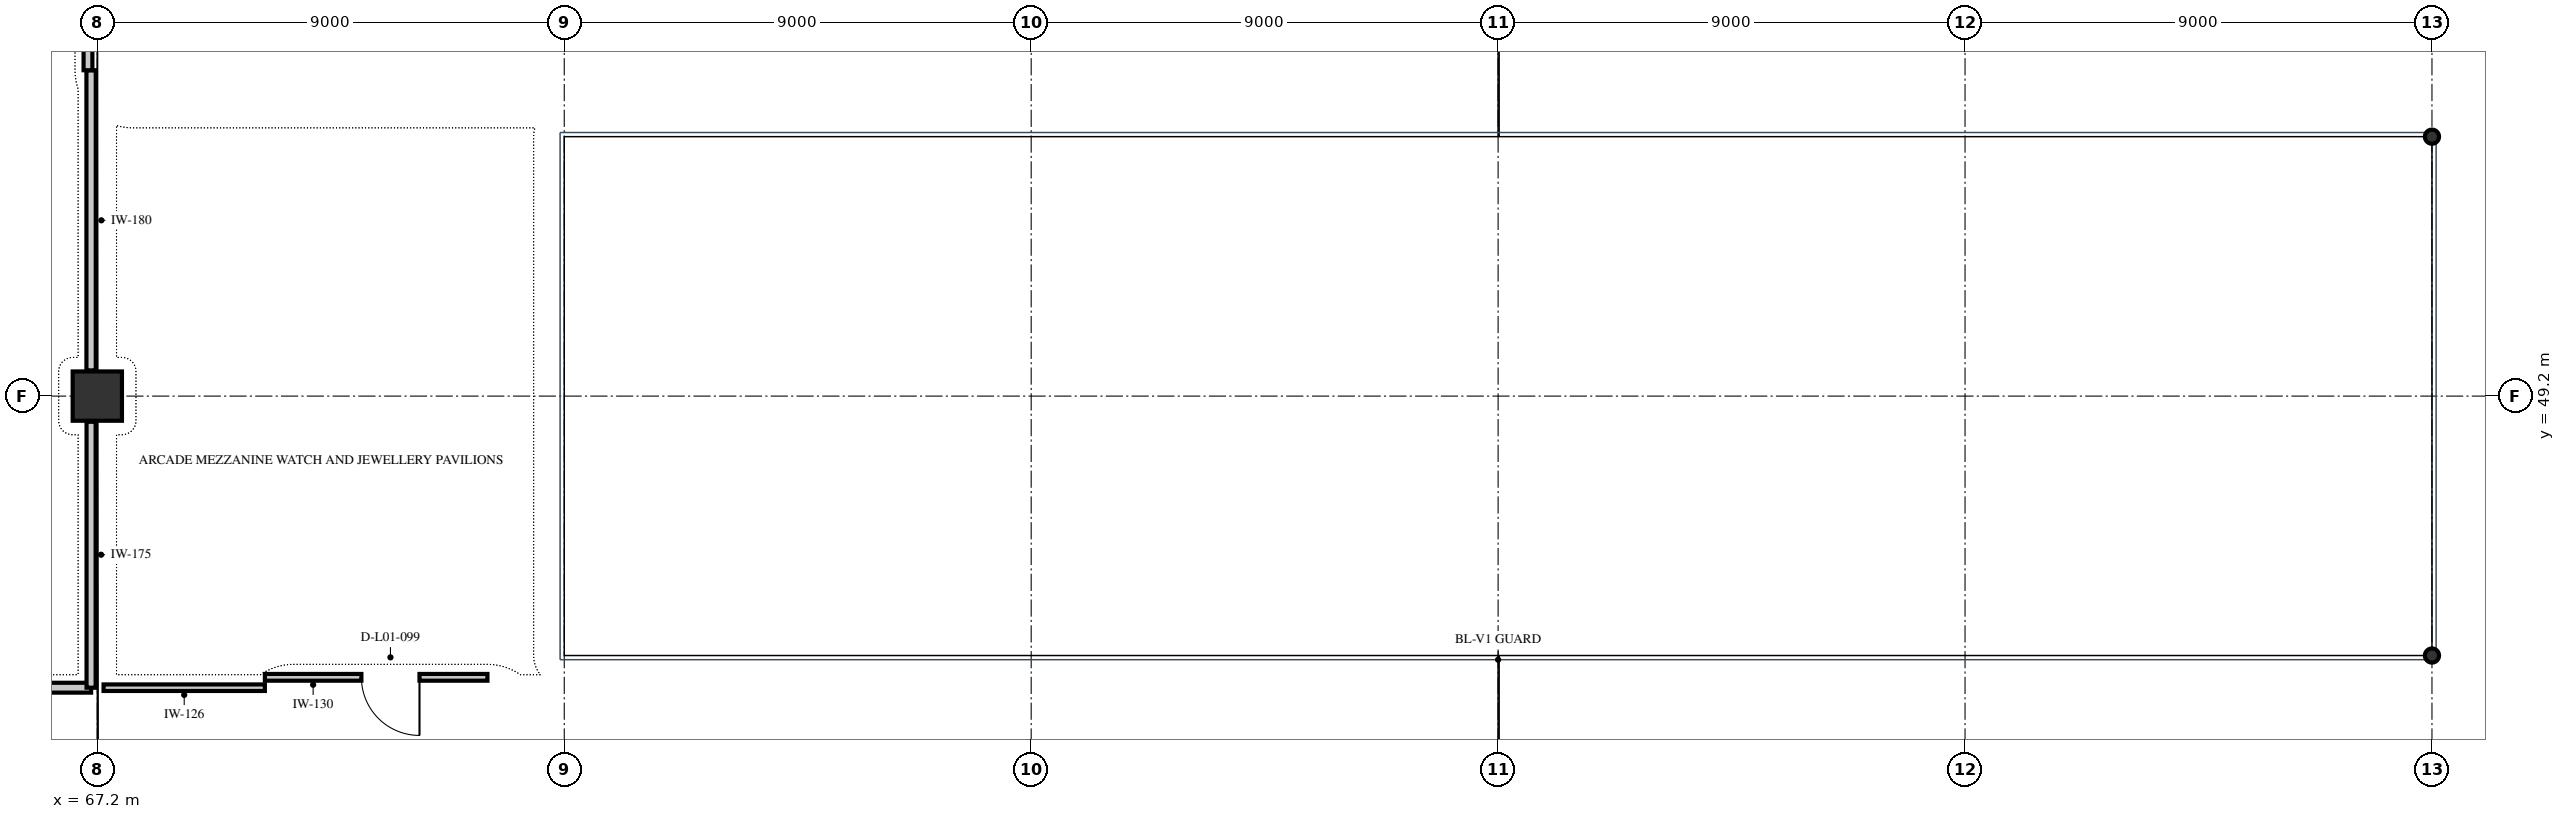
"""IFC4 building model, lengths in metres.
Left out: names, types, materials, properties, quantities, classifications, styles, units other than length and angle.
Written with IfcOpenShell. Run it as: python <this file> out.ifc"""

import sys

from ifc_helpers import new_model, si_unit, direction, frame, frame_2d, origin, origin_2d, place, context, subcontext, project, spatial, rectangle, hollow_circle, extrude, element, fill, save


model = new_model("IFC4")
c1 = context("Model", 3, precision=1e-05, world=origin(), true_north=direction((0.0, 1.0)))
c2 = subcontext(c1, "Body", "Model", "MODEL_VIEW")
j1 = project(units=[si_unit("LENGTHUNIT", "METRE"), si_unit("PLANEANGLEUNIT", "RADIAN")], contexts=[c1])
p1 = place(None, origin())
s1 = spatial("IfcSite", under=j1, at=p1, CompositionType="ELEMENT")
p2 = place(p1, origin())
s2 = spatial("IfcBuilding", under=s1, at=p2, CompositionType="ELEMENT")
p3 = place(p2, frame((0.0, 0.0, 5.4)))
s3 = spatial("IfcBuildingStorey", under=s2, at=p3, CompositionType="ELEMENT", Elevation=5.4)
p4 = place(p3, frame((67.2, 49.2, 0.0), z_axis=(0.0, 0.0, 1.0), x_axis=(1.0, 0.0, 0.0)))
e1 = element("IfcColumn", 1, at=p4, inside=s3, PredefinedType="COLUMN", context=c2, shape_type="SweptSolid", body=[
    extrude(rectangle(XDim=0.95, YDim=0.95, at=origin_2d()), origin(), (0.0, 0.0, 1.0), 4.8),
])
for number, where, z_axis, x_axis in (
    (2, (112.2, 44.2, 0.0), (0.0, 0.0, 1.0), (1.0, 0.0, 0.0)),
    (3, (112.2, 54.2, 0.0), (0.0, 0.0, 1.0), (1.0, 0.0, 0.0)),
):
    element("IfcColumn", number, at=place(p3, frame(where, z_axis=z_axis, x_axis=x_axis)), inside=s3, PredefinedType="COLUMN", context=c2, shape_type="SweptSolid", body=[
        extrude(hollow_circle(Radius=0.136, WallThickness=0.01, at=origin_2d()), origin(), (0.0, 0.0, 1.0), 4.8),
    ])
p5 = place(p3, frame((67.08, 43.58, 0.0), z_axis=(0.0, 0.0, 1.0), x_axis=(-1.0, 0.0, 0.0)))
e4 = element("IfcWall", 4, at=p5, inside=s3, PredefinedType="PARTITIONING", context=c2, shape_type="SweptSolid", body=[
    extrude(rectangle(XDim=18.773, YDim=0.19, at=frame_2d((9.387, 0.0))), origin(), (0.0, 0.0, 1.0), 3.445),
])
p6 = place(p5, frame((8.537, 0.0, 0.0)))
e5 = element("IfcOpeningElement", 5, at=p6, cuts=e4, PredefinedType="OPENING", context=c2, shape_type="SweptSolid", body=[
    extrude(rectangle(XDim=1.7, YDim=2.3, at=frame_2d((0.85, 1.15))), frame((0.0, 0.107, 0.0), z_axis=(0.0, -1.0, 0.0), x_axis=(1.0, 0.0, 0.0)), (0.0, 0.0, 1.0), 0.214),
])
p7 = place(p3, frame((67.08, 55.48, 0.0), z_axis=(0.0, 0.0, 1.0), x_axis=(0.0, -1.0, 0.0)))
e6 = element("IfcWall", 6, at=p7, inside=s3, PredefinedType="PARTITIONING", context=c2, shape_type="SweptSolid", body=[
    extrude(rectangle(XDim=5.785, YDim=0.18, at=frame_2d((2.893, 0.0))), origin(), (0.0, 0.0, 1.0), 3.445),
])
p8 = place(p3, frame((67.08, 48.705, 0.0), z_axis=(0.0, 0.0, 1.0), x_axis=(0.0, -1.0, 0.0)))
e7 = element("IfcWall", 7, at=p8, inside=s3, PredefinedType="PARTITIONING", context=c2, shape_type="SweptSolid", body=[
    extrude(rectangle(XDim=5.125, YDim=0.175, at=frame_2d((2.562, 0.0))), origin(), (0.0, 0.0, 1.0), 3.445),
])
p9 = place(p3, frame((67.02, 58.34, 0.0), z_axis=(0.0, 0.0, 1.0), x_axis=(0.0, -1.0, 0.0)))
e8 = element("IfcWall", 8, at=p9, inside=s3, PredefinedType="PARTITIONING", context=c2, shape_type="SweptSolid", body=[
    extrude(rectangle(XDim=2.86, YDim=0.17, at=frame_2d((1.43, 0.0))), origin(), (0.0, 0.0, 1.0), 3.445),
])
p10 = place(p3, frame((74.719, 43.78, 0.0), z_axis=(0.0, 0.0, 1.0), x_axis=(-1.0, 0.0, 0.0)))
e9 = element("IfcWall", 9, at=p10, inside=s3, PredefinedType="PARTITIONING", context=c2, shape_type="SweptSolid", body=[
    extrude(rectangle(XDim=4.29, YDim=0.13, at=frame_2d((2.145, 0.0))), origin(), (0.0, 0.0, 1.0), 4.505),
])
p11 = place(p10, frame((1.309, 0.0, 0.0)))
e10 = element("IfcOpeningElement", 10, at=p11, cuts=e9, PredefinedType="OPENING", context=c2, shape_type="SweptSolid", body=[
    extrude(rectangle(XDim=1.12, YDim=2.18, at=frame_2d((0.56, 1.09))), frame((0.0, 0.077, 0.0), z_axis=(0.0, -1.0, 0.0), x_axis=(1.0, 0.0, 0.0)), (0.0, 0.0, 1.0), 0.154),
])
p12 = place(p3, frame((70.43, 43.58, 0.0), z_axis=(0.0, 0.0, 1.0), x_axis=(-1.0, 0.0, 0.0)))
e11 = element("IfcWall", 11, at=p12, inside=s3, PredefinedType="PARTITIONING", context=c2, shape_type="SweptSolid", body=[
    extrude(rectangle(XDim=3.11, YDim=0.126, at=frame_2d((1.555, 0.0))), origin(), (0.0, 0.0, 1.0), 4.505),
])
p13 = place(p11, origin())
e12 = element("IfcDoor", 12, at=p13, inside=s3, OperationType="SINGLE_SWING_LEFT", PredefinedType="DOOR", context=c2, shape_type="SweptSolid", body=[
    extrude(rectangle(XDim=1.12, YDim=2.18, at=frame_2d((0.56, 1.09))), frame((0.0, 0.025, 0.0), z_axis=(0.0, -1.0, 0.0), x_axis=(1.0, 0.0, 0.0)), (0.0, 0.0, 1.0), 0.05),
])
fill(e10, e12)
save(model, sys.argv[1])
